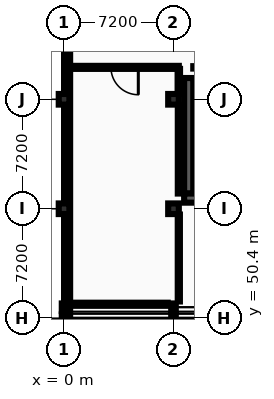
"""IFC4 building model, lengths in metres.
Left out: names, types, materials, properties, quantities, classifications, styles, units other than length and angle.
Written with IfcOpenShell. Run it as: python <this file> out.ifc"""

import sys

from ifc_helpers import new_model, si_unit, direction, frame, frame_2d, origin, origin_2d, place, context, subcontext, project, spatial, rectangle, i_section, extrude, element, fill, save


model = new_model("IFC4")
c1 = context("Model", 3, precision=1e-05, world=origin(), true_north=direction((0.0, 1.0)))
c2 = subcontext(c1, "Body", "Model", "MODEL_VIEW")
j1 = project(units=[si_unit("LENGTHUNIT", "METRE"), si_unit("PLANEANGLEUNIT", "RADIAN")], contexts=[c1])
p1 = place(None, origin())
s1 = spatial("IfcSite", under=j1, at=p1, CompositionType="ELEMENT")
p2 = place(p1, origin())
s2 = spatial("IfcBuilding", under=s1, at=p2, CompositionType="ELEMENT")
p3 = place(p2, frame((0.0, 0.0, -4.8)))
s3 = spatial("IfcBuildingStorey", under=s2, at=p3, CompositionType="ELEMENT", Elevation=-4.8)
for number, where, z_axis, x_axis in (
    (1, (0.0, 50.4, 0.0), (0.0, 0.0, 1.0), (1.0, 0.0, 0.0)),
    (2, (0.0, 51.12, 0.0), (0.0, 0.0, 1.0), (1.0, 0.0, 0.0)),
):
    element("IfcColumn", number, at=place(p3, frame(where, z_axis=z_axis, x_axis=x_axis)), inside=s3, PredefinedType="COLUMN", context=c2, shape_type="SweptSolid", body=[
        extrude(i_section(OverallWidth=0.3, OverallDepth=0.5, WebThickness=0.014, FlangeThickness=0.028, FilletRadius=0.027, at=origin_2d()), origin(), (0.0, 0.0, 1.0), 4.8),
    ])
for number, where, z_axis, x_axis in (
    (3, (0.0, 57.6, 0.0), (0.0, 0.0, 1.0), (1.0, 0.0, 0.0)),
    (4, (0.0, 64.8, 0.0), (0.0, 0.0, 1.0), (1.0, 0.0, 0.0)),
):
    element("IfcColumn", number, at=place(p3, frame(where, z_axis=z_axis, x_axis=x_axis)), inside=s3, PredefinedType="COLUMN", context=c2, shape_type="SweptSolid", body=[
        extrude(rectangle(XDim=0.7, YDim=0.7, at=origin_2d()), origin(), (0.0, 0.0, 1.0), 4.8),
    ])
for number, where, z_axis, x_axis in (
    (5, (7.2, 50.4, 0.0), (0.0, 0.0, 1.0), (1.0, 0.0, 0.0)),
    (6, (7.2, 51.12, 0.0), (0.0, 0.0, 1.0), (1.0, 0.0, 0.0)),
):
    element("IfcColumn", number, at=place(p3, frame(where, z_axis=z_axis, x_axis=x_axis)), inside=s3, PredefinedType="COLUMN", context=c2, shape_type="SweptSolid", body=[
        extrude(i_section(OverallWidth=0.3, OverallDepth=0.5, WebThickness=0.014, FlangeThickness=0.028, FilletRadius=0.027, at=origin_2d()), origin(), (0.0, 0.0, 1.0), 4.8),
    ])
for number, where, z_axis, x_axis in (
    (7, (7.2, 57.6, 0.0), (0.0, 0.0, 1.0), (1.0, 0.0, 0.0)),
    (8, (7.2, 64.8, 0.0), (0.0, 0.0, 1.0), (1.0, 0.0, 0.0)),
):
    element("IfcColumn", number, at=place(p3, frame(where, z_axis=z_axis, x_axis=x_axis)), inside=s3, PredefinedType="COLUMN", context=c2, shape_type="SweptSolid", body=[
        extrude(rectangle(XDim=0.7, YDim=0.7, at=origin_2d()), origin(), (0.0, 0.0, 1.0), 4.8),
    ])
p4 = place(p3, frame((0.2, 81.6, 0.0), z_axis=(0.0, 0.0, 1.0), x_axis=(0.0, -1.0, 0.0)))
e9 = element("IfcWall", 9, at=p4, inside=s3, PredefinedType="USERDEFINED", context=c2, shape_type="SweptSolid", body=[
    extrude(rectangle(XDim=81.2, YDim=0.4, at=frame_2d((40.6, 0.0))), origin(), (0.0, 0.0, 1.0), 4.545),
])
p5 = place(p3, frame((8.2, 58.6, 0.0), z_axis=(0.0, 0.0, 1.0), x_axis=(0.0, 1.0, 0.0)))
e10 = element("IfcWall", 10, at=p5, inside=s3, PredefinedType="SHEAR", context=c2, shape_type="SweptSolid", body=[
    extrude(rectangle(XDim=7.6, YDim=0.6, at=frame_2d((3.8, 0.0))), origin(), (0.0, 0.0, 1.0), 4.5),
])
p6 = place(p3, frame((7.9, 58.3, 0.0), z_axis=(0.0, 0.0, 1.0), x_axis=(1.0, 0.0, 0.0)))
e11 = element("IfcWall", 11, at=p6, inside=s3, PredefinedType="SHEAR", context=c2, shape_type="SweptSolid", body=[
    extrude(rectangle(XDim=13.0, YDim=0.6, at=frame_2d((6.5, 0.0))), origin(), (0.0, 0.0, 1.0), 4.5),
])
p7 = place(p3, frame((0.42, 51.32, 0.0), z_axis=(0.0, 0.0, 1.0), x_axis=(1.0, 0.0, 0.0)))
e12 = element("IfcWall", 12, at=p7, inside=s3, PredefinedType="PARTITIONING", context=c2, shape_type="SweptSolid", body=[
    extrude(rectangle(XDim=6.4, YDim=0.2, at=frame_2d((3.2, 0.0))), origin(), (0.0, 0.0, 1.0), 4.085),
])
p8 = place(p3, frame((0.42, 66.9, 0.0), z_axis=(0.0, 0.0, 1.0), x_axis=(1.0, 0.0, 0.0)))
e13 = element("IfcWall", 13, at=p8, inside=s3, PredefinedType="PARTITIONING", context=c2, shape_type="SweptSolid", body=[
    extrude(rectangle(XDim=7.13, YDim=0.2, at=frame_2d((3.565, 0.0))), origin(), (0.0, 0.0, 1.0), 4.545),
])
p9 = place(p8, frame((2.665, 0.0, 0.0)))
e14 = element("IfcOpeningElement", 14, at=p9, cuts=e13, PredefinedType="OPENING", context=c2, shape_type="SweptSolid", body=[
    extrude(rectangle(XDim=1.8, YDim=2.3, at=frame_2d((0.9, 1.15))), frame((0.0, 0.11, 0.0), z_axis=(0.0, -1.0, 0.0), x_axis=(1.0, 0.0, 0.0)), (0.0, 0.0, 1.0), 0.22),
])
p10 = place(p3, frame((8.5, 66.9, 0.0), z_axis=(0.0, 0.0, 1.0), x_axis=(1.0, 0.0, 0.0)))
e15 = element("IfcWall", 15, at=p10, inside=s3, PredefinedType="PARTITIONING", context=c2, shape_type="SweptSolid", body=[
    extrude(rectangle(XDim=11.8, YDim=0.158, at=frame_2d((5.9, 0.0))), origin(), (0.0, 0.0, 1.0), 4.545),
])
p11 = place(p10, frame((9.85, 0.0, 0.0)))
e16 = element("IfcOpeningElement", 16, at=p11, cuts=e15, PredefinedType="OPENING", context=c2, shape_type="SweptSolid", body=[
    extrude(rectangle(XDim=1.5, YDim=2.2, at=frame_2d((0.75, 1.1))), frame((0.0, 0.089, 0.0), z_axis=(0.0, -1.0, 0.0), x_axis=(1.0, 0.0, 0.0)), (0.0, 0.0, 1.0), 0.178),
])
p12 = place(p3, frame((7.55, 51.5, 0.0), z_axis=(0.0, 0.0, 1.0), x_axis=(0.0, 1.0, 0.0)))
e17 = element("IfcWall", 17, at=p12, inside=s3, PredefinedType="PARTITIONING", context=c2, shape_type="SweptSolid", body=[
    extrude(rectangle(XDim=5.72, YDim=0.142, at=frame_2d((2.86, 0.0))), origin(), (0.0, 0.0, 1.0), 4.545),
])
p13 = place(p3, frame((7.55, 58.6, 0.0), z_axis=(0.0, 0.0, 1.0), x_axis=(0.0, 1.0, 0.0)))
e18 = element("IfcWall", 18, at=p13, inside=s3, PredefinedType="PARTITIONING", context=c2, shape_type="SweptSolid", body=[
    extrude(rectangle(XDim=5.82, YDim=0.135, at=frame_2d((2.91, 0.0))), origin(), (0.0, 0.0, 1.0), 4.545),
])
p14 = place(p3, frame((7.55, 65.18, 0.0), z_axis=(0.0, 0.0, 1.0), x_axis=(0.0, 1.0, 0.0)))
e19 = element("IfcWall", 19, at=p14, inside=s3, PredefinedType="PARTITIONING", context=c2, shape_type="SweptSolid", body=[
    extrude(rectangle(XDim=1.62, YDim=0.16, at=frame_2d((0.81, 0.0))), origin(), (0.0, 0.0, 1.0), 4.545),
])
p15 = place(p9, origin())
e20 = element("IfcDoor", 20, at=p15, inside=s3, OperationType="DOUBLE_DOOR_SINGLE_SWING", PredefinedType="DOOR", context=c2, shape_type="SweptSolid", body=[
    extrude(rectangle(XDim=1.8, YDim=2.3, at=frame_2d((0.9, 1.15))), frame((0.0, 0.025, 0.0), z_axis=(0.0, -1.0, 0.0), x_axis=(1.0, 0.0, 0.0)), (0.0, 0.0, 1.0), 0.05),
])
fill(e14, e20)
save(model, sys.argv[1])
